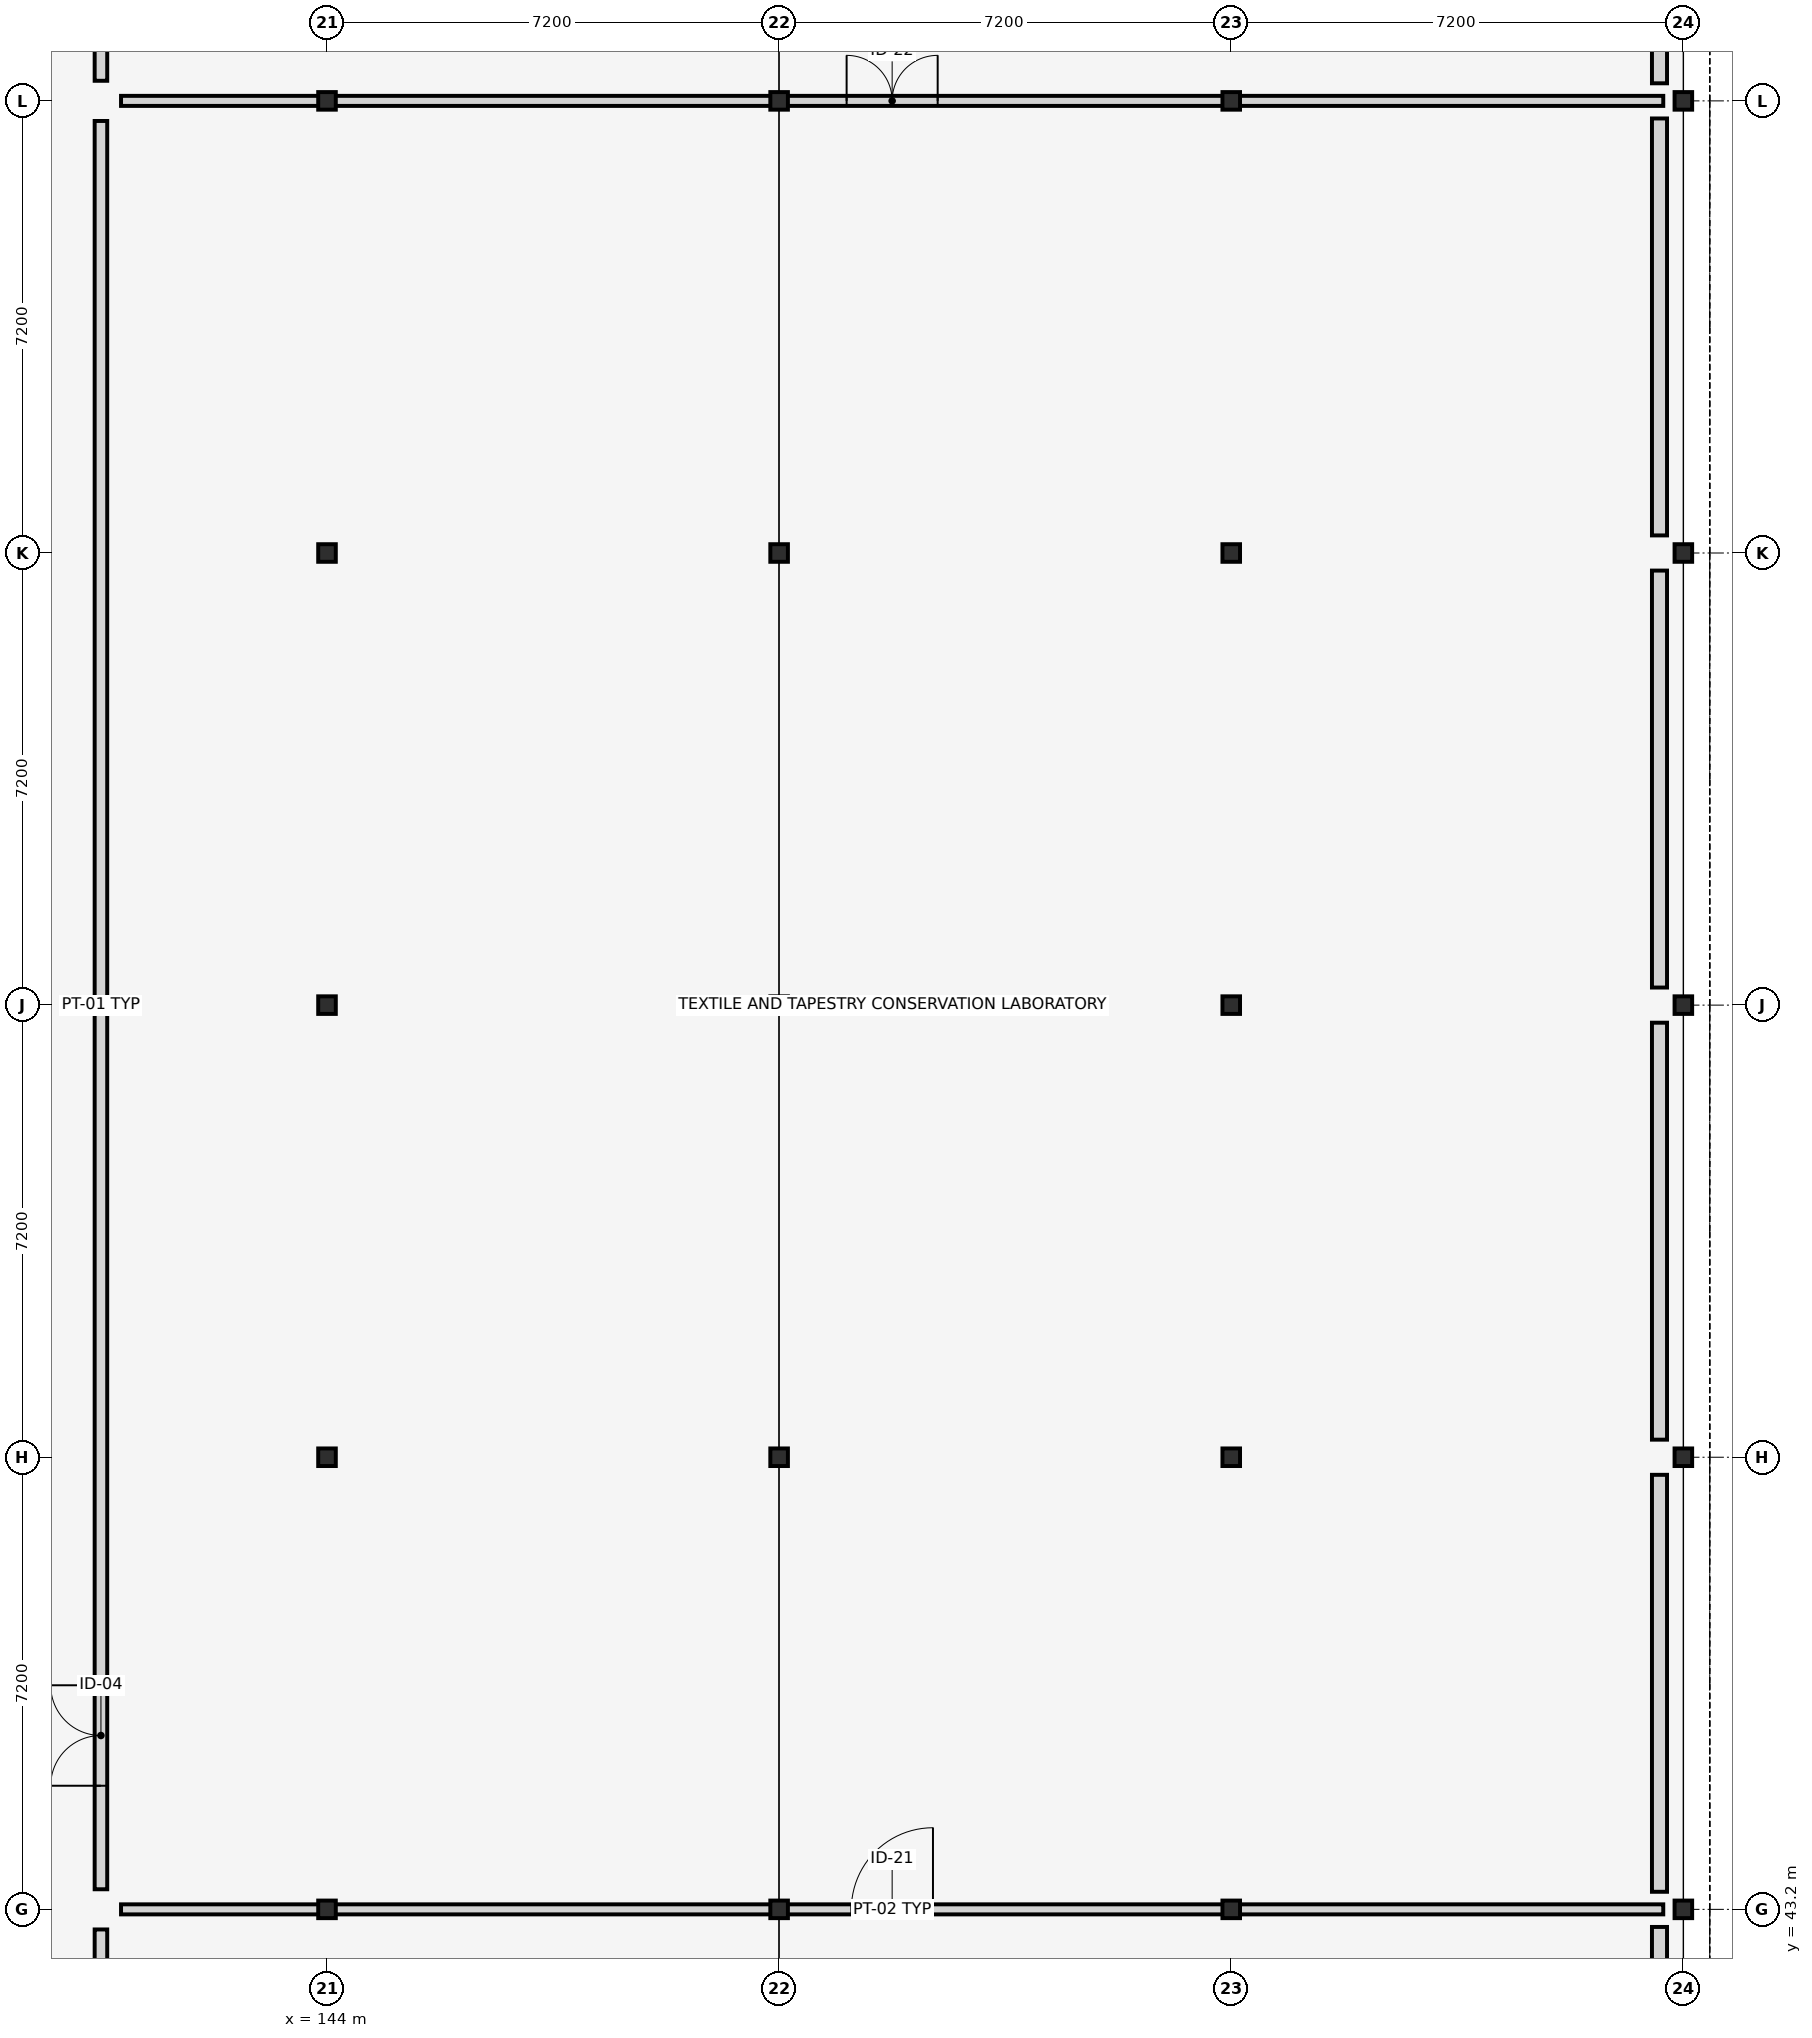
"""IFC4 building model, lengths in metres.
Left out: names, types, materials, properties, quantities, classifications, styles, units other than length and angle.
Written with IfcOpenShell. Run it as: python <this file> out.ifc"""

import sys

from ifc_helpers import new_model, si_unit, direction, frame, frame_2d, origin, origin_2d, place, context, subcontext, project, spatial, rectangle, i_section, extrude, element, fill, save


model = new_model("IFC4")
c1 = context("Model", 3, precision=1e-05, world=origin(), true_north=direction((0.0, 1.0)))
c2 = subcontext(c1, "Body", "Model", "MODEL_VIEW")
j1 = project(units=[si_unit("LENGTHUNIT", "METRE"), si_unit("PLANEANGLEUNIT", "RADIAN")], contexts=[c1])
p1 = place(None, origin())
s1 = spatial("IfcSite", under=j1, at=p1, CompositionType="ELEMENT")
p2 = place(p1, origin())
s2 = spatial("IfcBuilding", under=s1, at=p2, CompositionType="ELEMENT")
p3 = place(p2, frame((0.0, 0.0, 4.5)))
s3 = spatial("IfcBuildingStorey", under=s2, at=p3, CompositionType="ELEMENT", Elevation=4.5)
for number, where, z_axis, x_axis in (
    (1, (144.0, 43.2, 0.0), (0.0, 0.0, 1.0), (1.0, 0.0, 0.0)),
    (2, (144.0, 50.4, 0.0), (0.0, 0.0, 1.0), (0.0, 1.0, 0.0)),
    (3, (144.0, 57.6, 0.0), (0.0, 0.0, 1.0), (1.0, 0.0, 0.0)),
    (4, (144.0, 64.8, 0.0), (0.0, 0.0, 1.0), (0.0, 1.0, 0.0)),
    (5, (144.0, 72.0, 0.0), (0.0, 0.0, 1.0), (1.0, 0.0, 0.0)),
    (6, (151.2, 43.2, 0.0), (0.0, 0.0, 1.0), (0.0, 1.0, 0.0)),
    (7, (151.2, 50.4, 0.0), (0.0, 0.0, 1.0), (1.0, 0.0, 0.0)),
    (8, (151.2, 57.6, 0.0), (0.0, 0.0, 1.0), (0.0, 1.0, 0.0)),
    (9, (151.2, 64.8, 0.0), (0.0, 0.0, 1.0), (1.0, 0.0, 0.0)),
    (10, (151.2, 72.0, 0.0), (0.0, 0.0, 1.0), (0.0, 1.0, 0.0)),
    (11, (158.4, 43.2, 0.0), (0.0, 0.0, 1.0), (1.0, 0.0, 0.0)),
    (12, (158.4, 50.4, 0.0), (0.0, 0.0, 1.0), (0.0, 1.0, 0.0)),
    (13, (158.4, 57.6, 0.0), (0.0, 0.0, 1.0), (1.0, 0.0, 0.0)),
    (14, (158.4, 64.8, 0.0), (0.0, 0.0, 1.0), (0.0, 1.0, 0.0)),
    (15, (158.4, 72.0, 0.0), (0.0, 0.0, 1.0), (1.0, 0.0, 0.0)),
    (16, (165.6, 43.2, 0.0), (0.0, 0.0, 1.0), (0.0, 1.0, 0.0)),
    (17, (165.6, 50.4, 0.0), (0.0, 0.0, 1.0), (1.0, 0.0, 0.0)),
    (18, (165.6, 57.6, 0.0), (0.0, 0.0, 1.0), (0.0, 1.0, 0.0)),
    (19, (165.6, 64.8, 0.0), (0.0, 0.0, 1.0), (1.0, 0.0, 0.0)),
    (20, (165.6, 72.0, 0.0), (0.0, 0.0, 1.0), (0.0, 1.0, 0.0)),
):
    element("IfcColumn", number, at=place(p3, frame(where, z_axis=z_axis, x_axis=x_axis)), inside=s3, PredefinedType="COLUMN", context=c2, shape_type="SweptSolid", body=[
        extrude(i_section(OverallWidth=0.28, OverallDepth=0.28, WebThickness=0.01, FlangeThickness=0.018, FilletRadius=0.024, at=origin_2d()), origin(), (0.0, 0.0, 1.0), 4.2),
    ])
p4 = place(p3, frame((165.22, 36.28, 0.0), z_axis=(0.0, 0.0, 1.0), x_axis=(0.0, 1.0, 0.0)))
e21 = element("IfcWall", 21, at=p4, inside=s3, PredefinedType="STANDARD", context=c2, shape_type="SweptSolid", body=[
    extrude(rectangle(XDim=6.64, YDim=0.24, at=frame_2d((3.32, 0.0))), origin(), (0.0, 0.0, 1.0), 3.58),
])
for number, where, z_axis, x_axis in (
    (22, (165.22, 43.48, 0.0), (0.0, 0.0, 1.0), (0.0, 1.0, 0.0)),
    (23, (165.22, 50.68, 0.0), (0.0, 0.0, 1.0), (0.0, 1.0, 0.0)),
    (24, (165.22, 57.88, 0.0), (0.0, 0.0, 1.0), (0.0, 1.0, 0.0)),
):
    element("IfcWall", number, at=place(p3, frame(where, z_axis=z_axis, x_axis=x_axis)), inside=s3, PredefinedType="STANDARD", context=c2, shape_type="SweptSolid", body=[
        extrude(rectangle(XDim=6.64, YDim=0.24, at=frame_2d((3.32, 0.0))), origin(), (0.0, 0.0, 1.0), 3.58),
    ])
for number, where, z_axis, x_axis in (
    (25, (165.22, 65.08, 0.0), (0.0, 0.0, 1.0), (0.0, 1.0, 0.0)),
    (26, (165.22, 72.28, 0.0), (0.0, 0.0, 1.0), (0.0, 1.0, 0.0)),
):
    element("IfcWall", number, at=place(p3, frame(where, z_axis=z_axis, x_axis=x_axis)), inside=s3, PredefinedType="STANDARD", context=c2, shape_type="SweptSolid", body=[
        extrude(rectangle(XDim=6.64, YDim=0.24, at=frame_2d((3.32, 0.0))), origin(), (0.0, 0.0, 1.0), 3.58),
    ])
p5 = place(p3, frame((140.4, 14.72, 0.0), z_axis=(0.0, 0.0, 1.0), x_axis=(0.0, 1.0, 0.0)))
e27 = element("IfcWall", 27, at=p5, inside=s3, PredefinedType="PARTITIONING", context=c2, shape_type="SweptSolid", body=[
    extrude(rectangle(XDim=28.16, YDim=0.2, at=frame_2d((14.08, 0.0))), origin(), (0.0, 0.0, 1.0), 3.15),
])
p6 = place(p5, frame((1.699, 0.0, 0.0)))
e28 = element("IfcOpeningElement", 28, at=p6, cuts=e27, PredefinedType="OPENING", context=c2, shape_type="SweptSolid", body=[
    extrude(rectangle(XDim=1.5, YDim=2.25, at=frame_2d((0.75, 1.125))), frame((0.0, 0.11, 0.0), z_axis=(0.0, -1.0, 0.0), x_axis=(1.0, 0.0, 0.0)), (0.0, 0.0, 1.0), 0.22),
])
p7 = place(p3, frame((140.4, 43.52, 0.0), z_axis=(0.0, 0.0, 1.0), x_axis=(0.0, 1.0, 0.0)))
e29 = element("IfcWall", 29, at=p7, inside=s3, PredefinedType="PARTITIONING", context=c2, shape_type="SweptSolid", body=[
    extrude(rectangle(XDim=28.16, YDim=0.2, at=frame_2d((14.08, 0.0))), origin(), (0.0, 0.0, 1.0), 3.15),
])
p8 = place(p7, frame((1.649, 0.0, 0.0)))
e30 = element("IfcOpeningElement", 30, at=p8, cuts=e29, PredefinedType="OPENING", context=c2, shape_type="SweptSolid", body=[
    extrude(rectangle(XDim=1.6, YDim=2.35, at=frame_2d((0.8, 1.175))), frame((0.0, 0.11, 0.0), z_axis=(0.0, -1.0, 0.0), x_axis=(1.0, 0.0, 0.0)), (0.0, 0.0, 1.0), 0.22),
])
p9 = place(p3, frame((140.4, 72.32, 0.0), z_axis=(0.0, 0.0, 1.0), x_axis=(0.0, 1.0, 0.0)))
e31 = element("IfcWall", 31, at=p9, inside=s3, PredefinedType="PARTITIONING", context=c2, shape_type="SweptSolid", body=[
    extrude(rectangle(XDim=28.16, YDim=0.2, at=frame_2d((14.08, 0.0))), origin(), (0.0, 0.0, 1.0), 3.15),
])
p10 = place(p9, frame((1.649, 0.0, 0.0)))
e32 = element("IfcOpeningElement", 32, at=p10, cuts=e31, PredefinedType="OPENING", context=c2, shape_type="SweptSolid", body=[
    extrude(rectangle(XDim=1.6, YDim=2.35, at=frame_2d((0.8, 1.175))), frame((0.0, 0.11, 0.0), z_axis=(0.0, -1.0, 0.0), x_axis=(1.0, 0.0, 0.0)), (0.0, 0.0, 1.0), 0.22),
])
p11 = place(p3, frame((140.72, 43.2, 0.0), z_axis=(0.0, 0.0, 1.0), x_axis=(1.0, 0.0, 0.0)))
e33 = element("IfcWall", 33, at=p11, inside=s3, PredefinedType="PARTITIONING", context=c2, shape_type="SweptSolid", body=[
    extrude(rectangle(XDim=24.56, YDim=0.16, at=frame_2d((12.28, 0.0))), origin(), (0.0, 0.0, 1.0), 3.15),
])
p12 = place(p11, frame((11.63, 0.0, 0.0)))
e34 = element("IfcOpeningElement", 34, at=p12, cuts=e33, PredefinedType="OPENING", context=c2, shape_type="SweptSolid", body=[
    extrude(rectangle(XDim=1.3, YDim=2.45, at=frame_2d((0.65, 1.225))), frame((0.0, 0.09, 0.0), z_axis=(0.0, -1.0, 0.0), x_axis=(1.0, 0.0, 0.0)), (0.0, 0.0, 1.0), 0.18),
])
p13 = place(p3, frame((140.72, 72.0, 0.0), z_axis=(0.0, 0.0, 1.0), x_axis=(1.0, 0.0, 0.0)))
e35 = element("IfcWall", 35, at=p13, inside=s3, PredefinedType="PARTITIONING", context=c2, shape_type="SweptSolid", body=[
    extrude(rectangle(XDim=24.56, YDim=0.16, at=frame_2d((12.28, 0.0))), origin(), (0.0, 0.0, 1.0), 3.15),
])
p14 = place(p13, frame((11.555, 0.0, 0.0)))
e36 = element("IfcOpeningElement", 36, at=p14, cuts=e35, PredefinedType="OPENING", context=c2, shape_type="SweptSolid", body=[
    extrude(rectangle(XDim=1.45, YDim=2.35, at=frame_2d((0.725, 1.175))), frame((0.0, 0.09, 0.0), z_axis=(0.0, -1.0, 0.0), x_axis=(1.0, 0.0, 0.0)), (0.0, 0.0, 1.0), 0.18),
])
p15 = place(p8, origin())
e37 = element("IfcDoor", 37, at=p15, inside=s3, OperationType="DOUBLE_DOOR_SINGLE_SWING", PredefinedType="DOOR", context=c2, shape_type="SweptSolid", body=[
    extrude(rectangle(XDim=1.6, YDim=2.35, at=frame_2d((0.8, 1.175))), frame((0.0, 0.025, 0.0), z_axis=(0.0, -1.0, 0.0), x_axis=(1.0, 0.0, 0.0)), (0.0, 0.0, 1.0), 0.05),
])
fill(e30, e37)
p16 = place(p12, origin())
e38 = element("IfcDoor", 38, at=p16, inside=s3, OperationType="SINGLE_SWING_RIGHT", PredefinedType="DOOR", context=c2, shape_type="SweptSolid", body=[
    extrude(rectangle(XDim=1.3, YDim=2.45, at=frame_2d((0.65, 1.225))), frame((0.0, 0.025, 0.0), z_axis=(0.0, -1.0, 0.0), x_axis=(1.0, 0.0, 0.0)), (0.0, 0.0, 1.0), 0.05),
])
fill(e34, e38)
p17 = place(p14, origin())
e39 = element("IfcDoor", 39, at=p17, inside=s3, OperationType="DOUBLE_DOOR_SINGLE_SWING", PredefinedType="DOOR", context=c2, shape_type="SweptSolid", body=[
    extrude(rectangle(XDim=1.45, YDim=2.35, at=frame_2d((0.725, 1.175))), frame((0.0, 0.025, 0.0), z_axis=(0.0, -1.0, 0.0), x_axis=(1.0, 0.0, 0.0)), (0.0, 0.0, 1.0), 0.05),
])
fill(e36, e39)
save(model, sys.argv[1])
